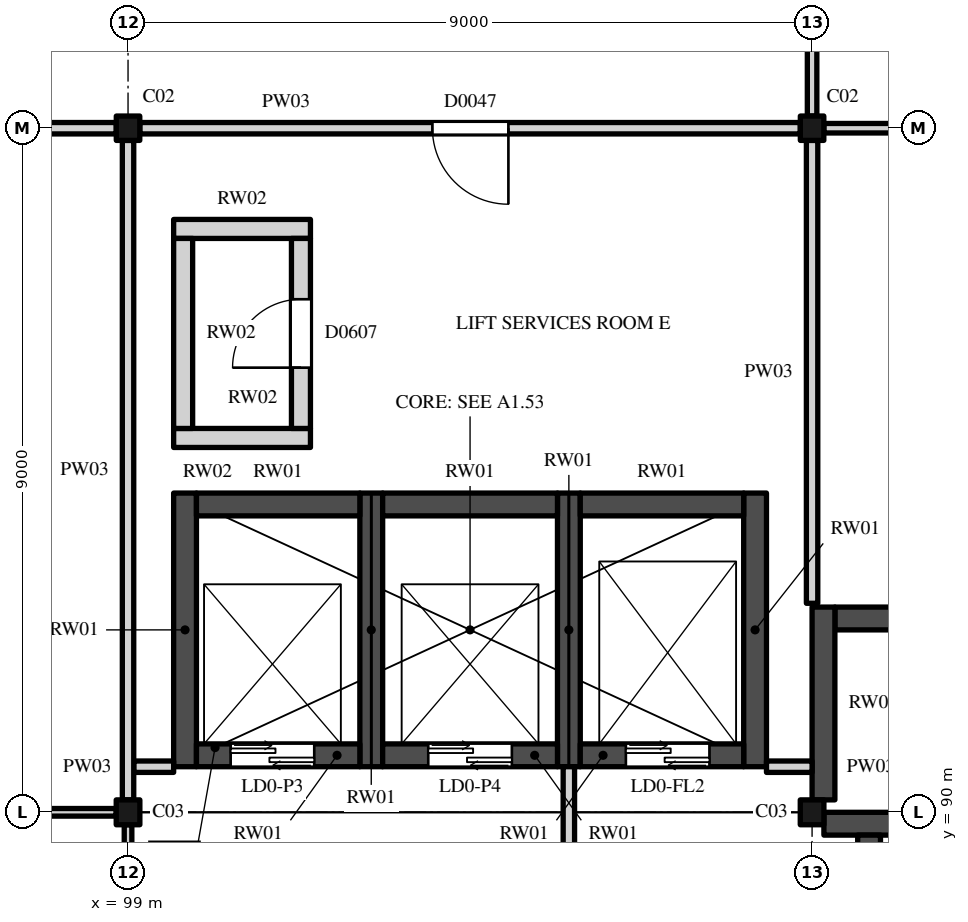
"""IFC4 building model, lengths in metres.
Left out: names, types, materials, properties, quantities, classifications, styles, units other than length and angle.
Written with IfcOpenShell. Run it as: python <this file> out.ifc"""

import sys

from ifc_helpers import new_model, si_unit, direction, frame, frame_2d, origin, origin_2d, place, context, subcontext, project, spatial, rectangle, i_section, extrude, element, fill, save


model = new_model("IFC4")
c1 = context("Model", 3, precision=1e-05, world=origin(), true_north=direction((0.0, 1.0)))
c2 = subcontext(c1, "Body", "Model", "MODEL_VIEW")
j1 = project(units=[si_unit("LENGTHUNIT", "METRE"), si_unit("PLANEANGLEUNIT", "RADIAN")], contexts=[c1])
p1 = place(None, origin())
s1 = spatial("IfcSite", under=j1, at=p1, CompositionType="ELEMENT")
p2 = place(p1, origin())
s2 = spatial("IfcBuilding", under=s1, at=p2, CompositionType="ELEMENT")
p3 = place(p2, origin())
s3 = spatial("IfcBuildingStorey", under=s2, at=p3, CompositionType="ELEMENT", Elevation=0.0)
for number, where, z_axis, x_axis in (
    (1, (99.0, 90.0, 0.0), (0.0, 0.0, 1.0), (1.0, 0.0, 0.0)),
    (2, (108.0, 90.0, 0.0), (0.0, 0.0, 1.0), (1.0, 0.0, 0.0)),
):
    element("IfcColumn", number, at=place(p3, frame(where, z_axis=z_axis, x_axis=x_axis)), inside=s3, PredefinedType="COLUMN", context=c2, shape_type="SweptSolid", body=[
        extrude(i_section(OverallWidth=0.311, OverallDepth=0.327, WebThickness=0.016, FlangeThickness=0.025, FilletRadius=0.017, at=origin_2d()), origin(), (0.0, 0.0, 1.0), 6.0),
    ])
for number, where, z_axis, x_axis in (
    (3, (99.0, 99.0, 0.0), (0.0, 0.0, 1.0), (1.0, 0.0, 0.0)),
    (4, (108.0, 99.0, 0.0), (0.0, 0.0, 1.0), (1.0, 0.0, 0.0)),
):
    element("IfcColumn", number, at=place(p3, frame(where, z_axis=z_axis, x_axis=x_axis)), inside=s3, PredefinedType="COLUMN", context=c2, shape_type="SweptSolid", body=[
        extrude(i_section(OverallWidth=0.309, OverallDepth=0.321, WebThickness=0.014, FlangeThickness=0.022, FilletRadius=0.017, at=origin_2d()), origin(), (0.0, 0.0, 1.0), 6.0),
    ])
p4 = place(p3, frame((108.156, 89.85, 0.0), z_axis=(0.0, 0.0, 1.0), x_axis=(1.0, 0.0, 0.0)))
e5 = element("IfcWall", 5, at=p4, inside=s3, PredefinedType="SHEAR", context=c2, shape_type="SweptSolid", body=[
    extrude(rectangle(XDim=8.544, YDim=0.3, at=frame_2d((4.272, 0.0))), origin(), (0.0, 0.0, 1.0), 6.0),
])
p5 = place(p4, frame((1.044, 0.0, 0.0)))
e6 = element("IfcOpeningElement", 6, at=p5, cuts=e5, PredefinedType="OPENING", context=c2, shape_type="SweptSolid", body=[
    extrude(rectangle(XDim=1.2, YDim=2.1, at=frame_2d((0.6, 1.05))), frame((0.0, 0.16, 0.0), z_axis=(0.0, -1.0, 0.0), x_axis=(1.0, 0.0, 0.0)), (0.0, 0.0, 1.0), 0.32),
])
p6 = place(p3, frame((108.75, 81.9, 0.0), z_axis=(0.0, 0.0, 1.0), x_axis=(0.0, 1.0, 0.0)))
e7 = element("IfcWall", 7, at=p6, inside=s3, PredefinedType="SHEAR", context=c2, shape_type="SweptSolid", body=[
    extrude(rectangle(XDim=7.8, YDim=0.3, at=frame_2d((3.9, 0.0))), origin(), (0.0, 0.0, 1.0), 6.0),
])
p7 = place(p6, frame((3.0, 0.0, 0.0)))
e8 = element("IfcOpeningElement", 8, at=p7, cuts=e7, PredefinedType="OPENING", context=c2, shape_type="SweptSolid", body=[
    extrude(rectangle(XDim=1.2, YDim=2.1, at=frame_2d((0.6, 1.05))), frame((0.0, 0.16, 0.0), z_axis=(0.0, -1.0, 0.0), x_axis=(1.0, 0.0, 0.0)), (0.0, 0.0, 1.0), 0.32),
])
p8 = place(p3, frame((108.3, 92.55, 0.0), z_axis=(0.0, 0.0, 1.0), x_axis=(1.0, 0.0, 0.0)))
e9 = element("IfcWall", 9, at=p8, inside=s3, PredefinedType="SHEAR", context=c2, shape_type="SweptSolid", body=[
    extrude(rectangle(XDim=8.4, YDim=0.3, at=frame_2d((4.2, 0.0))), origin(), (0.0, 0.0, 1.0), 6.0),
])
p9 = place(p3, frame((108.15, 90.164, 0.0), z_axis=(0.0, 0.0, 1.0), x_axis=(0.0, 1.0, 0.0)))
e10 = element("IfcWall", 10, at=p9, inside=s3, PredefinedType="SHEAR", context=c2, shape_type="SweptSolid", body=[
    extrude(rectangle(XDim=2.536, YDim=0.3, at=frame_2d((1.268, 0.0))), origin(), (0.0, 0.0, 1.0), 6.0),
])
for number, where, z_axis, x_axis in (
    (11, (99.75, 90.6, -1.5), (0.0, 0.0, 1.0), (0.0, 1.0, 0.0)),
    (12, (102.2, 90.6, -1.5), (0.0, 0.0, 1.0), (0.0, 1.0, 0.0)),
    (13, (104.8, 90.6, -1.5), (0.0, 0.0, 1.0), (0.0, 1.0, 0.0)),
    (14, (107.25, 90.6, -1.5), (0.0, 0.0, 1.0), (0.0, 1.0, 0.0)),
):
    element("IfcWall", number, at=place(p3, frame(where, z_axis=z_axis, x_axis=x_axis)), inside=s3, PredefinedType="SHEAR", context=c2, shape_type="SweptSolid", body=[
        extrude(rectangle(XDim=3.6, YDim=0.3, at=frame_2d((1.8, 0.0))), origin(), (0.0, 0.0, 1.0), 7.5),
    ])
p10 = place(p3, frame((99.9, 90.75, -1.5), z_axis=(0.0, 0.0, 1.0), x_axis=(1.0, 0.0, 0.0)))
e15 = element("IfcWall", 15, at=p10, inside=s3, PredefinedType="SHEAR", context=c2, shape_type="SweptSolid", body=[
    extrude(rectangle(XDim=2.15, YDim=0.3, at=frame_2d((1.075, 0.0))), origin(), (0.0, 0.0, 1.0), 7.5),
])
p11 = place(p10, frame((0.45, 0.0, 1.5)))
e16 = element("IfcOpeningElement", 16, at=p11, cuts=e15, PredefinedType="OPENING", context=c2, shape_type="SweptSolid", body=[
    extrude(rectangle(XDim=1.1, YDim=2.1, at=frame_2d((0.55, 1.05))), frame((0.0, 0.16, 0.0), z_axis=(0.0, -1.0, 0.0), x_axis=(1.0, 0.0, 0.0)), (0.0, 0.0, 1.0), 0.32),
])
p12 = place(p3, frame((99.9, 94.05, -1.5), z_axis=(0.0, 0.0, 1.0), x_axis=(1.0, 0.0, 0.0)))
e17 = element("IfcWall", 17, at=p12, inside=s3, PredefinedType="SHEAR", context=c2, shape_type="SweptSolid", body=[
    extrude(rectangle(XDim=2.15, YDim=0.3, at=frame_2d((1.075, 0.0))), origin(), (0.0, 0.0, 1.0), 7.5),
])
p13 = place(p3, frame((102.35, 90.75, -1.5), z_axis=(0.0, 0.0, 1.0), x_axis=(1.0, 0.0, 0.0)))
e18 = element("IfcWall", 18, at=p13, inside=s3, PredefinedType="SHEAR", context=c2, shape_type="SweptSolid", body=[
    extrude(rectangle(XDim=2.3, YDim=0.3, at=frame_2d((1.15, 0.0))), origin(), (0.0, 0.0, 1.0), 7.5),
])
p14 = place(p13, frame((0.6, 0.0, 1.5)))
e19 = element("IfcOpeningElement", 19, at=p14, cuts=e18, PredefinedType="OPENING", context=c2, shape_type="SweptSolid", body=[
    extrude(rectangle(XDim=1.1, YDim=2.1, at=frame_2d((0.55, 1.05))), frame((0.0, 0.16, 0.0), z_axis=(0.0, -1.0, 0.0), x_axis=(1.0, 0.0, 0.0)), (0.0, 0.0, 1.0), 0.32),
])
p15 = place(p3, frame((102.35, 94.05, -1.5), z_axis=(0.0, 0.0, 1.0), x_axis=(1.0, 0.0, 0.0)))
e20 = element("IfcWall", 20, at=p15, inside=s3, PredefinedType="SHEAR", context=c2, shape_type="SweptSolid", body=[
    extrude(rectangle(XDim=2.3, YDim=0.3, at=frame_2d((1.15, 0.0))), origin(), (0.0, 0.0, 1.0), 7.5),
])
p16 = place(p3, frame((104.95, 90.75, -1.5), z_axis=(0.0, 0.0, 1.0), x_axis=(1.0, 0.0, 0.0)))
e21 = element("IfcWall", 21, at=p16, inside=s3, PredefinedType="SHEAR", context=c2, shape_type="SweptSolid", body=[
    extrude(rectangle(XDim=2.15, YDim=0.3, at=frame_2d((1.075, 0.0))), origin(), (0.0, 0.0, 1.0), 7.5),
])
p17 = place(p16, frame((0.6, 0.0, 1.5)))
e22 = element("IfcOpeningElement", 22, at=p17, cuts=e21, PredefinedType="OPENING", context=c2, shape_type="SweptSolid", body=[
    extrude(rectangle(XDim=1.1, YDim=2.1, at=frame_2d((0.55, 1.05))), frame((0.0, 0.16, 0.0), z_axis=(0.0, -1.0, 0.0), x_axis=(1.0, 0.0, 0.0)), (0.0, 0.0, 1.0), 0.32),
])
p18 = place(p3, frame((104.95, 94.05, -1.5), z_axis=(0.0, 0.0, 1.0), x_axis=(1.0, 0.0, 0.0)))
e23 = element("IfcWall", 23, at=p18, inside=s3, PredefinedType="SHEAR", context=c2, shape_type="SweptSolid", body=[
    extrude(rectangle(XDim=2.15, YDim=0.3, at=frame_2d((1.075, 0.0))), origin(), (0.0, 0.0, 1.0), 7.5),
])
for number, where, z_axis, x_axis in (
    (24, (99.6, 94.925, 0.0), (0.0, 0.0, 1.0), (1.0, 0.0, 0.0)),
    (25, (99.6, 97.675, 0.0), (0.0, 0.0, 1.0), (1.0, 0.0, 0.0)),
):
    element("IfcWall", number, at=place(p3, frame(where, z_axis=z_axis, x_axis=x_axis)), inside=s3, PredefinedType="STANDARD", context=c2, shape_type="SweptSolid", body=[
        extrude(rectangle(XDim=1.8, YDim=0.25, at=frame_2d((0.9, 0.0))), origin(), (0.0, 0.0, 1.0), 6.0),
    ])
p19 = place(p3, frame((99.725, 95.05, 0.0), z_axis=(0.0, 0.0, 1.0), x_axis=(0.0, 1.0, 0.0)))
e26 = element("IfcWall", 26, at=p19, inside=s3, PredefinedType="STANDARD", context=c2, shape_type="SweptSolid", body=[
    extrude(rectangle(XDim=2.5, YDim=0.25, at=frame_2d((1.25, 0.0))), origin(), (0.0, 0.0, 1.0), 6.0),
])
p20 = place(p3, frame((101.275, 95.05, 0.0), z_axis=(0.0, 0.0, 1.0), x_axis=(0.0, 1.0, 0.0)))
e27 = element("IfcWall", 27, at=p20, inside=s3, PredefinedType="STANDARD", context=c2, shape_type="SweptSolid", body=[
    extrude(rectangle(XDim=2.5, YDim=0.25, at=frame_2d((1.25, 0.0))), origin(), (0.0, 0.0, 1.0), 6.0),
])
p21 = place(p20, frame((0.8, 0.0, 0.0)))
e28 = element("IfcOpeningElement", 28, at=p21, cuts=e27, PredefinedType="OPENING", context=c2, shape_type="SweptSolid", body=[
    extrude(rectangle(XDim=0.9, YDim=2.1, at=frame_2d((0.45, 1.05))), frame((0.0, 0.135, 0.0), z_axis=(0.0, -1.0, 0.0), x_axis=(1.0, 0.0, 0.0)), (0.0, 0.0, 1.0), 0.27),
])
p22 = place(p3, frame((90.156, 90.0, 0.0), z_axis=(0.0, 0.0, 1.0), x_axis=(1.0, 0.0, 0.0)))
e29 = element("IfcWall", 29, at=p22, inside=s3, PredefinedType="PARTITIONING", context=c2, shape_type="SweptSolid", body=[
    extrude(rectangle(XDim=8.689, YDim=0.1, at=frame_2d((4.344, 0.0))), origin(), (0.0, 0.0, 1.0), 5.466),
])
p23 = place(p3, frame((99.075, 90.6, 0.0), z_axis=(0.0, 0.0, 1.0), x_axis=(1.0, 0.0, 0.0)))
e30 = element("IfcWall", 30, at=p23, inside=s3, PredefinedType="PARTITIONING", context=c2, shape_type="SweptSolid", body=[
    extrude(rectangle(XDim=0.525, YDim=0.15, at=frame_2d((0.263, 0.0))), origin(), (0.0, 0.0, 1.0), 5.825),
])
p24 = place(p3, frame((107.4, 90.6, 0.0), z_axis=(0.0, 0.0, 1.0), x_axis=(1.0, 0.0, 0.0)))
e31 = element("IfcWall", 31, at=p24, inside=s3, PredefinedType="PARTITIONING", context=c2, shape_type="SweptSolid", body=[
    extrude(rectangle(XDim=0.6, YDim=0.15, at=frame_2d((0.3, 0.0))), origin(), (0.0, 0.0, 1.0), 5.825),
])
p25 = place(p3, frame((90.155, 99.0, 0.0), z_axis=(0.0, 0.0, 1.0), x_axis=(1.0, 0.0, 0.0)))
e32 = element("IfcWall", 32, at=p25, inside=s3, PredefinedType="PARTITIONING", context=c2, shape_type="SweptSolid", body=[
    extrude(rectangle(XDim=8.691, YDim=0.15, at=frame_2d((4.345, 0.0))), origin(), (0.0, 0.0, 1.0), 5.466),
])
p26 = place(p3, frame((99.155, 99.0, 0.0), z_axis=(0.0, 0.0, 1.0), x_axis=(1.0, 0.0, 0.0)))
e33 = element("IfcWall", 33, at=p26, inside=s3, PredefinedType="PARTITIONING", context=c2, shape_type="SweptSolid", body=[
    extrude(rectangle(XDim=8.691, YDim=0.15, at=frame_2d((4.345, 0.0))), origin(), (0.0, 0.0, 1.0), 5.466),
])
p27 = place(p26, frame((3.85, 0.0, 0.0)))
e34 = element("IfcOpeningElement", 34, at=p27, cuts=e33, PredefinedType="OPENING", context=c2, shape_type="SweptSolid", body=[
    extrude(rectangle(XDim=1.0, YDim=2.4, at=frame_2d((0.5, 1.2))), frame((0.0, 0.085, 0.0), z_axis=(0.0, -1.0, 0.0), x_axis=(1.0, 0.0, 0.0)), (0.0, 0.0, 1.0), 0.17),
])
p28 = place(p3, frame((108.155, 99.0, 0.0), z_axis=(0.0, 0.0, 1.0), x_axis=(1.0, 0.0, 0.0)))
e35 = element("IfcWall", 35, at=p28, inside=s3, PredefinedType="PARTITIONING", context=c2, shape_type="SweptSolid", body=[
    extrude(rectangle(XDim=5.307, YDim=0.125, at=frame_2d((2.654, 0.0))), origin(), (0.0, 0.0, 1.0), 5.466),
])
p29 = place(p3, frame((99.0, 81.164, 0.0), z_axis=(0.0, 0.0, 1.0), x_axis=(0.0, 1.0, 0.0)))
e36 = element("IfcWall", 36, at=p29, inside=s3, PredefinedType="PARTITIONING", context=c2, shape_type="SweptSolid", body=[
    extrude(rectangle(XDim=8.673, YDim=0.1, at=frame_2d((4.336, 0.0))), origin(), (0.0, 0.0, 1.0), 5.365),
])
p30 = place(p3, frame((99.0, 90.164, 0.0), z_axis=(0.0, 0.0, 1.0), x_axis=(0.0, 1.0, 0.0)))
e37 = element("IfcWall", 37, at=p30, inside=s3, PredefinedType="PARTITIONING", context=c2, shape_type="SweptSolid", body=[
    extrude(rectangle(XDim=8.676, YDim=0.15, at=frame_2d((4.338, 0.0))), origin(), (0.0, 0.0, 1.0), 5.365),
])
p31 = place(p3, frame((104.8, 84.075, 0.0), z_axis=(0.0, 0.0, 1.0), x_axis=(0.0, 1.0, 0.0)))
e38 = element("IfcWall", 38, at=p31, inside=s3, PredefinedType="PARTITIONING", context=c2, shape_type="SweptSolid", body=[
    extrude(rectangle(XDim=6.525, YDim=0.15, at=frame_2d((3.263, 0.0))), origin(), (0.0, 0.0, 1.0), 5.825),
])
p32 = place(p31, frame((2.85, 0.0, 0.0)))
e39 = element("IfcOpeningElement", 39, at=p32, cuts=e38, PredefinedType="OPENING", context=c2, shape_type="SweptSolid", body=[
    extrude(rectangle(XDim=0.9, YDim=2.1, at=frame_2d((0.45, 1.05))), frame((0.0, 0.085, 0.0), z_axis=(0.0, -1.0, 0.0), x_axis=(1.0, 0.0, 0.0)), (0.0, 0.0, 1.0), 0.17),
])
p33 = place(p3, frame((108.0, 92.75, 0.0), z_axis=(0.0, 0.0, 1.0), x_axis=(0.0, 1.0, 0.0)))
e40 = element("IfcWall", 40, at=p33, inside=s3, PredefinedType="PARTITIONING", context=c2, shape_type="SweptSolid", body=[
    extrude(rectangle(XDim=6.09, YDim=0.15, at=frame_2d((3.045, 0.0))), origin(), (0.0, 0.0, 1.0), 5.365),
])
p34 = place(p3, frame((108.0, 99.16, 0.0), z_axis=(0.0, 0.0, 1.0), x_axis=(0.0, 1.0, 0.0)))
e41 = element("IfcWall", 41, at=p34, inside=s3, PredefinedType="PARTITIONING", context=c2, shape_type="SweptSolid", body=[
    extrude(rectangle(XDim=2.777, YDim=0.125, at=frame_2d((1.389, 0.0))), origin(), (0.0, 0.0, 1.0), 5.365),
])
p35 = place(p11, origin())
e42 = element("IfcDoor", 42, at=p35, inside=s3, OperationType="DOUBLE_DOOR_SLIDING", PredefinedType="DOOR", context=c2, shape_type="SweptSolid", body=[
    extrude(rectangle(XDim=1.1, YDim=2.1, at=frame_2d((0.55, 1.05))), frame((0.0, 0.025, 0.0), z_axis=(0.0, -1.0, 0.0), x_axis=(1.0, 0.0, 0.0)), (0.0, 0.0, 1.0), 0.05),
])
fill(e16, e42)
p36 = place(p14, origin())
e43 = element("IfcDoor", 43, at=p36, inside=s3, OperationType="DOUBLE_DOOR_SLIDING", PredefinedType="DOOR", context=c2, shape_type="SweptSolid", body=[
    extrude(rectangle(XDim=1.1, YDim=2.1, at=frame_2d((0.55, 1.05))), frame((0.0, 0.025, 0.0), z_axis=(0.0, -1.0, 0.0), x_axis=(1.0, 0.0, 0.0)), (0.0, 0.0, 1.0), 0.05),
])
fill(e19, e43)
p37 = place(p17, origin())
e44 = element("IfcDoor", 44, at=p37, inside=s3, OperationType="DOUBLE_DOOR_SLIDING", PredefinedType="DOOR", context=c2, shape_type="SweptSolid", body=[
    extrude(rectangle(XDim=1.1, YDim=2.1, at=frame_2d((0.55, 1.05))), frame((0.0, 0.025, 0.0), z_axis=(0.0, -1.0, 0.0), x_axis=(1.0, 0.0, 0.0)), (0.0, 0.0, 1.0), 0.05),
])
fill(e22, e44)
p38 = place(p21, origin())
e45 = element("IfcDoor", 45, at=p38, inside=s3, OperationType="SINGLE_SWING_RIGHT", PredefinedType="DOOR", context=c2, shape_type="SweptSolid", body=[
    extrude(rectangle(XDim=0.9, YDim=2.1, at=frame_2d((0.45, 1.05))), frame((0.0, 0.025, 0.0), z_axis=(0.0, -1.0, 0.0), x_axis=(1.0, 0.0, 0.0)), (0.0, 0.0, 1.0), 0.05),
])
fill(e28, e45)
p39 = place(p27, origin())
e46 = element("IfcDoor", 46, at=p39, inside=s3, OperationType="SINGLE_SWING_RIGHT", PredefinedType="DOOR", context=c2, shape_type="SweptSolid", body=[
    extrude(rectangle(XDim=1.0, YDim=2.4, at=frame_2d((0.5, 1.2))), frame((0.0, 0.025, 0.0), z_axis=(0.0, -1.0, 0.0), x_axis=(1.0, 0.0, 0.0)), (0.0, 0.0, 1.0), 0.05),
])
fill(e34, e46)
save(model, sys.argv[1])
